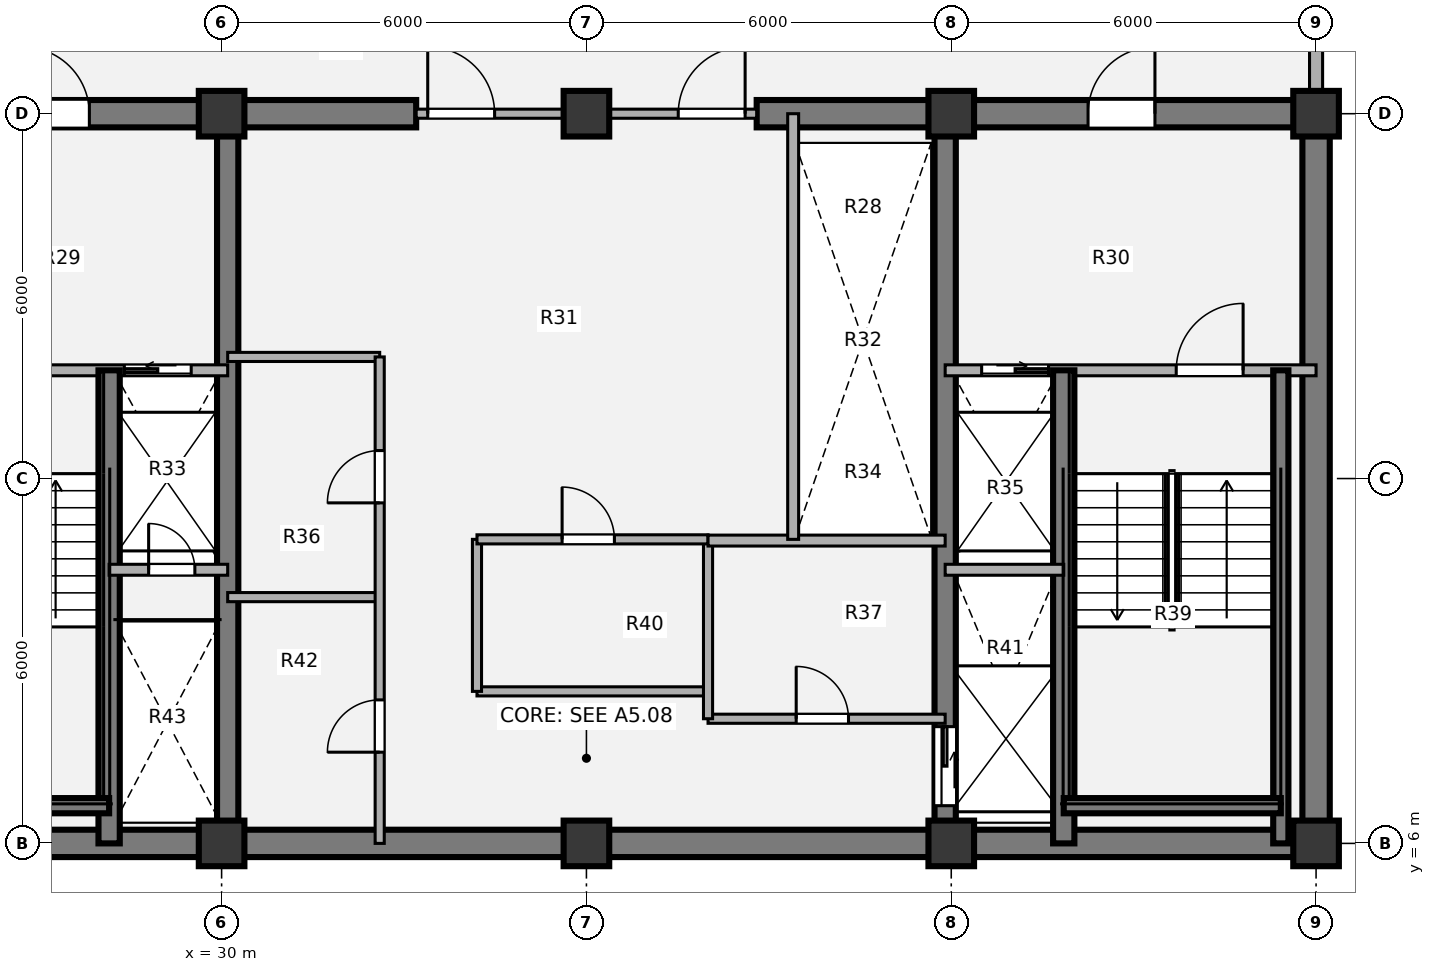
"""IFC4 building model, lengths in metres.
Left out: names, types, materials, properties, quantities, classifications, styles, units other than length and angle.
Written with IfcOpenShell. Run it as: python <this file> out.ifc"""

import sys

from ifc_helpers import new_model, si_unit, direction, frame, frame_2d, origin, origin_2d, place, context, subcontext, project, spatial, rectangle, extrude, source, transform, mapped, element, fill, save


model = new_model("IFC4")
c1 = context("Model", 3, precision=1e-05, world=origin(), true_north=direction((0.0, 1.0)))
c2 = subcontext(c1, "Body", "Model", "MODEL_VIEW")
j1 = project(units=[si_unit("LENGTHUNIT", "METRE"), si_unit("PLANEANGLEUNIT", "RADIAN")], contexts=[c1])
p1 = place(None, origin())
s1 = spatial("IfcSite", under=j1, at=p1, CompositionType="ELEMENT")
p2 = place(p1, origin())
s2 = spatial("IfcBuilding", under=s1, at=p2, CompositionType="ELEMENT")
p3 = place(p2, frame((0.0, 0.0, 160.2)))
s3 = spatial("IfcBuildingStorey", under=s2, at=p3, CompositionType="ELEMENT", Elevation=160.2)
m1 = source(origin(), c2, "Body", "SweptSolid", [
    extrude(rectangle(XDim=0.75, YDim=0.75, at=origin_2d()), origin(), (0.0, 0.0, 1.0), 3.78),
])
for number, where, z_axis, x_axis in (
    (1, (30.0, 6.0, 0.0), (0.0, 0.0, 1.0), (1.0, 0.0, 0.0)),
    (2, (36.0, 6.0, 0.0), (0.0, 0.0, 1.0), (1.0, 0.0, 0.0)),
    (3, (42.0, 6.0, 0.0), (0.0, 0.0, 1.0), (1.0, 0.0, 0.0)),
    (4, (48.0, 6.0, 0.0), (0.0, 0.0, 1.0), (1.0, 0.0, 0.0)),
    (5, (30.0, 18.0, 0.0), (0.0, 0.0, 1.0), (1.0, 0.0, 0.0)),
    (6, (36.0, 18.0, 0.0), (0.0, 0.0, 1.0), (1.0, 0.0, 0.0)),
    (7, (42.0, 18.0, 0.0), (0.0, 0.0, 1.0), (1.0, 0.0, 0.0)),
    (8, (48.0, 18.0, 0.0), (0.0, 0.0, 1.0), (1.0, 0.0, 0.0)),
):
    element("IfcColumn", number, at=place(p3, frame(where, z_axis=z_axis, x_axis=x_axis)), inside=s3, PredefinedType="COLUMN", context=c2, shape_type="MappedRepresentation", body=[
        mapped(m1, transform((0.0, 0.0, 0.0), x_axis=(1.0, 0.0, 0.0), y_axis=(0.0, 1.0, 0.0), z_axis=(0.0, 0.0, 1.0), scale=1.0)),
    ])
p4 = place(p3, frame((48.225, 6.0, 0.0), z_axis=(0.0, 0.0, 1.0), x_axis=(-1.0, 0.0, 0.0)))
e9 = element("IfcWall", 9, at=p4, inside=s3, PredefinedType="SHEAR", context=c2, shape_type="SweptSolid", body=[
    extrude(rectangle(XDim=24.45, YDim=0.45, at=frame_2d((12.225, 0.0))), origin(), (0.0, 0.0, 1.0), 3.78),
])
p5 = place(p3, frame((48.0, 18.0, 0.0), z_axis=(0.0, 0.0, 1.0), x_axis=(0.0, -1.0, 0.0)))
e10 = element("IfcWall", 10, at=p5, inside=s3, PredefinedType="SHEAR", context=c2, shape_type="SweptSolid", body=[
    extrude(rectangle(XDim=12.0, YDim=0.45, at=frame_2d((6.0, 0.0))), origin(), (0.0, 0.0, 1.0), 3.78),
])
p6 = place(p3, frame((23.775, 18.0, 0.0), z_axis=(0.0, 0.0, 1.0), x_axis=(1.0, 0.0, 0.0)))
e11 = element("IfcWall", 11, at=p6, inside=s3, PredefinedType="SHEAR", context=c2, shape_type="SweptSolid", body=[
    extrude(rectangle(XDim=9.425, YDim=0.45, at=frame_2d((4.712, 0.0))), origin(), (0.0, 0.0, 1.0), 3.78),
])
p7 = place(p6, frame((2.95, 0.0, 0.0)))
e12 = element("IfcOpeningElement", 12, at=p7, cuts=e11, PredefinedType="OPENING", context=c2, shape_type="SweptSolid", body=[
    extrude(rectangle(XDim=1.1, YDim=2.1, at=origin_2d()), frame((0.55, 0.235, 1.05), z_axis=(0.0, -1.0, 0.0), x_axis=(1.0, 0.0, 0.0)), (0.0, 0.0, 1.0), 0.47),
])
p8 = place(p3, frame((38.8, 18.0, 0.0), z_axis=(0.0, 0.0, 1.0), x_axis=(1.0, 0.0, 0.0)))
e13 = element("IfcWall", 13, at=p8, inside=s3, PredefinedType="SHEAR", context=c2, shape_type="SweptSolid", body=[
    extrude(rectangle(XDim=9.425, YDim=0.45, at=frame_2d((4.712, 0.0))), origin(), (0.0, 0.0, 1.0), 3.78),
])
p9 = place(p8, frame((5.45, 0.0, 0.0)))
e14 = element("IfcOpeningElement", 14, at=p9, cuts=e13, PredefinedType="OPENING", context=c2, shape_type="SweptSolid", body=[
    extrude(rectangle(XDim=1.1, YDim=2.1, at=origin_2d()), frame((0.55, 0.235, 1.05), z_axis=(0.0, -1.0, 0.0), x_axis=(1.0, 0.0, 0.0)), (0.0, 0.0, 1.0), 0.47),
])
p10 = place(p3, frame((30.1, 6.0, 0.0), z_axis=(0.0, 0.0, 1.0), x_axis=(0.0, 1.0, 0.0)))
e15 = element("IfcWall", 15, at=p10, inside=s3, PredefinedType="SHEAR", context=c2, shape_type="SweptSolid", body=[
    extrude(rectangle(XDim=12.0, YDim=0.35, at=frame_2d((6.0, 0.0))), origin(), (0.0, 0.0, 1.0), 3.78),
])
p11 = place(p3, frame((41.9, 18.0, 0.0), z_axis=(0.0, 0.0, 1.0), x_axis=(0.0, -1.0, 0.0)))
e16 = element("IfcWall", 16, at=p11, inside=s3, PredefinedType="SHEAR", context=c2, shape_type="SweptSolid", body=[
    extrude(rectangle(XDim=12.0, YDim=0.35, at=frame_2d((6.0, 0.0))), origin(), (0.0, 0.0, 1.0), 3.78),
])
p12 = place(p11, frame((10.08, 0.0, 0.0)))
e17 = element("IfcOpeningElement", 17, at=p12, cuts=e16, PredefinedType="OPENING", context=c2, shape_type="SweptSolid", body=[
    extrude(rectangle(XDim=1.3, YDim=2.1, at=origin_2d()), frame((0.65, 0.185, 1.05), z_axis=(0.0, -1.0, 0.0), x_axis=(1.0, 0.0, 0.0)), (0.0, 0.0, 1.0), 0.37),
])
p13 = place(p3, frame((48.0, 21.05, 0.0), z_axis=(0.0, 0.0, 1.0), x_axis=(0.0, -1.0, 0.0)))
e18 = element("IfcWall", 18, at=p13, inside=s3, PredefinedType="SOLIDWALL", context=c2, shape_type="SweptSolid", body=[
    extrude(rectangle(XDim=2.695, YDim=0.215, at=frame_2d((1.348, 0.0))), origin(), (0.0, 0.0, 1.0), 2.718),
])
p14 = place(p3, frame((30.1, 14.0, 0.0), z_axis=(0.0, 0.0, 1.0), x_axis=(1.0, 0.0, 0.0)))
e19 = element("IfcWall", 19, at=p14, inside=s3, PredefinedType="PARTITIONING", context=c2, shape_type="SweptSolid", body=[
    extrude(rectangle(XDim=2.5, YDim=0.15, at=frame_2d((1.25, 0.0))), origin(), (0.0, 0.0, 1.0), 3.5),
])
p15 = place(p3, frame((34.2, 8.5, 0.0), z_axis=(0.0, 0.0, 1.0), x_axis=(1.0, 0.0, 0.0)))
e20 = element("IfcWall", 20, at=p15, inside=s3, PredefinedType="PARTITIONING", context=c2, shape_type="SweptSolid", body=[
    extrude(rectangle(XDim=3.8, YDim=0.15, at=frame_2d((1.9, 0.0))), origin(), (0.0, 0.0, 1.0), 3.5),
])
p16 = place(p3, frame((38.0, 8.05, 0.0), z_axis=(0.0, 0.0, 1.0), x_axis=(1.0, 0.0, 0.0)))
e21 = element("IfcWall", 21, at=p16, inside=s3, PredefinedType="PARTITIONING", context=c2, shape_type="SweptSolid", body=[
    extrude(rectangle(XDim=3.9, YDim=0.15, at=frame_2d((1.95, 0.0))), origin(), (0.0, 0.0, 1.0), 3.5),
])
p17 = place(p16, frame((1.45, 0.0, 0.0)))
e22 = element("IfcOpeningElement", 22, at=p17, cuts=e21, PredefinedType="OPENING", context=c2, shape_type="SweptSolid", body=[
    extrude(rectangle(XDim=0.86, YDim=2.1, at=origin_2d()), frame((0.43, 0.085, 1.05), z_axis=(0.0, -1.0, 0.0), x_axis=(1.0, 0.0, 0.0)), (0.0, 0.0, 1.0), 0.17),
])
p18 = place(p3, frame((34.2, 8.5, 0.0), z_axis=(0.0, 0.0, 1.0), x_axis=(0.0, 1.0, 0.0)))
e23 = element("IfcWall", 23, at=p18, inside=s3, PredefinedType="PARTITIONING", context=c2, shape_type="SweptSolid", body=[
    extrude(rectangle(XDim=2.5, YDim=0.15, at=frame_2d((1.25, 0.0))), origin(), (0.0, 0.0, 1.0), 3.5),
])
p19 = place(p3, frame((38.0, 8.05, 0.0), z_axis=(0.0, 0.0, 1.0), x_axis=(0.0, 1.0, 0.0)))
e24 = element("IfcWall", 24, at=p19, inside=s3, PredefinedType="PARTITIONING", context=c2, shape_type="SweptSolid", body=[
    extrude(rectangle(XDim=2.95, YDim=0.15, at=frame_2d((1.475, 0.0))), origin(), (0.0, 0.0, 1.0), 3.5),
])
p20 = place(p3, frame((34.2, 11.0, 0.0), z_axis=(0.0, 0.0, 1.0), x_axis=(1.0, 0.0, 0.0)))
e25 = element("IfcWall", 25, at=p20, inside=s3, PredefinedType="PARTITIONING", context=c2, shape_type="SweptSolid", body=[
    extrude(rectangle(XDim=3.8, YDim=0.15, at=frame_2d((1.9, 0.0))), origin(), (0.0, 0.0, 1.0), 3.5),
])
p21 = place(p20, frame((1.4, 0.0, 0.0)))
e26 = element("IfcOpeningElement", 26, at=p21, cuts=e25, PredefinedType="OPENING", context=c2, shape_type="SweptSolid", body=[
    extrude(rectangle(XDim=0.86, YDim=2.1, at=origin_2d()), frame((0.43, 0.085, 1.05), z_axis=(0.0, -1.0, 0.0), x_axis=(1.0, 0.0, 0.0)), (0.0, 0.0, 1.0), 0.17),
])
p22 = place(p3, frame((38.0, 10.98, 0.0), z_axis=(0.0, 0.0, 1.0), x_axis=(1.0, 0.0, 0.0)))
e27 = element("IfcWall", 27, at=p22, inside=s3, PredefinedType="PARTITIONING", context=c2, shape_type="SweptSolid", body=[
    extrude(rectangle(XDim=3.9, YDim=0.18, at=frame_2d((1.95, 0.0))), origin(), (0.0, 0.0, 1.0), 3.5),
])
p23 = place(p3, frame((39.4, 11.0, 0.0), z_axis=(0.0, 0.0, 1.0), x_axis=(0.0, 1.0, 0.0)))
e28 = element("IfcWall", 28, at=p23, inside=s3, PredefinedType="PARTITIONING", context=c2, shape_type="SweptSolid", body=[
    extrude(rectangle(XDim=7.0, YDim=0.18, at=frame_2d((3.5, 0.0))), origin(), (0.0, 0.0, 1.0), 3.5),
])
p24 = place(p3, frame((30.1, 10.05, 0.0), z_axis=(0.0, 0.0, 1.0), x_axis=(1.0, 0.0, 0.0)))
e29 = element("IfcWall", 29, at=p24, inside=s3, PredefinedType="PARTITIONING", context=c2, shape_type="SweptSolid", body=[
    extrude(rectangle(XDim=2.5, YDim=0.15, at=frame_2d((1.25, 0.0))), origin(), (0.0, 0.0, 1.0), 3.5),
])
p25 = place(p3, frame((32.6, 6.0, 0.0), z_axis=(0.0, 0.0, 1.0), x_axis=(0.0, 1.0, 0.0)))
e30 = element("IfcWall", 30, at=p25, inside=s3, PredefinedType="PARTITIONING", context=c2, shape_type="SweptSolid", body=[
    extrude(rectangle(XDim=8.0, YDim=0.15, at=frame_2d((4.0, 0.0))), origin(), (0.0, 0.0, 1.0), 3.5),
])
p26 = place(p25, frame((1.5, 0.0, 0.0)))
e31 = element("IfcOpeningElement", 31, at=p26, cuts=e30, PredefinedType="OPENING", context=c2, shape_type="SweptSolid", body=[
    extrude(rectangle(XDim=0.86, YDim=2.1, at=origin_2d()), frame((0.43, 0.085, 1.05), z_axis=(0.0, -1.0, 0.0), x_axis=(1.0, 0.0, 0.0)), (0.0, 0.0, 1.0), 0.17),
])
p27 = place(p25, frame((5.6, 0.0, 0.0)))
e32 = element("IfcOpeningElement", 32, at=p27, cuts=e30, PredefinedType="OPENING", context=c2, shape_type="SweptSolid", body=[
    extrude(rectangle(XDim=0.86, YDim=2.1, at=origin_2d()), frame((0.43, 0.085, 1.05), z_axis=(0.0, -1.0, 0.0), x_axis=(1.0, 0.0, 0.0)), (0.0, 0.0, 1.0), 0.17),
])
p28 = place(p3, frame((33.2, 18.0, 0.0), z_axis=(0.0, 0.0, 1.0), x_axis=(1.0, 0.0, 0.0)))
e33 = element("IfcWall", 33, at=p28, inside=s3, PredefinedType="PARTITIONING", context=c2, shape_type="SweptSolid", body=[
    extrude(rectangle(XDim=5.6, YDim=0.15, at=frame_2d((2.8, 0.0))), origin(), (0.0, 0.0, 1.0), 2.515),
])
p29 = place(p28, frame((0.19, 0.0, 0.0)))
e34 = element("IfcOpeningElement", 34, at=p29, cuts=e33, PredefinedType="OPENING", context=c2, shape_type="SweptSolid", body=[
    extrude(rectangle(XDim=1.1, YDim=2.1, at=origin_2d()), frame((0.55, 0.085, 1.05), z_axis=(0.0, -1.0, 0.0), x_axis=(1.0, 0.0, 0.0)), (0.0, 0.0, 1.0), 0.17),
])
p30 = place(p28, frame((4.31, 0.0, 0.0)))
e35 = element("IfcOpeningElement", 35, at=p30, cuts=e33, PredefinedType="OPENING", context=c2, shape_type="SweptSolid", body=[
    extrude(rectangle(XDim=1.1, YDim=2.1, at=origin_2d()), frame((0.55, 0.085, 1.05), z_axis=(0.0, -1.0, 0.0), x_axis=(1.0, 0.0, 0.0)), (0.0, 0.0, 1.0), 0.17),
])
p31 = place(p3, frame((24.0, 13.78, 0.0), z_axis=(0.0, 0.0, 1.0), x_axis=(1.0, 0.0, 0.0)))
e36 = element("IfcWall", 36, at=p31, inside=s3, PredefinedType="PARTITIONING", context=c2, shape_type="SweptSolid", body=[
    extrude(rectangle(XDim=6.1, YDim=0.18, at=frame_2d((3.05, 0.0))), origin(), (0.0, 0.0, 1.0), 3.5),
])
p32 = place(p31, frame((1.15, 0.0, 0.0)))
e37 = element("IfcOpeningElement", 37, at=p32, cuts=e36, PredefinedType="OPENING", context=c2, shape_type="SweptSolid", body=[
    extrude(rectangle(XDim=1.1, YDim=2.1, at=origin_2d()), frame((0.55, 0.1, 1.05), z_axis=(0.0, -1.0, 0.0), x_axis=(1.0, 0.0, 0.0)), (0.0, 0.0, 1.0), 0.2),
])
p33 = place(p31, frame((4.4, 0.0, 0.0)))
e38 = element("IfcOpeningElement", 38, at=p33, cuts=e36, PredefinedType="OPENING", context=c2, shape_type="SweptSolid", body=[
    extrude(rectangle(XDim=1.1, YDim=2.1, at=origin_2d()), frame((0.55, 0.1, 1.05), z_axis=(0.0, -1.0, 0.0), x_axis=(1.0, 0.0, 0.0)), (0.0, 0.0, 1.0), 0.2),
])
p34 = place(p3, frame((28.15, 6.0, 0.0), z_axis=(0.0, 0.0, 1.0), x_axis=(0.0, 1.0, 0.0)))
e39 = element("IfcWall", 39, at=p34, inside=s3, PredefinedType="SHEAR", context=c2, shape_type="SweptSolid", body=[
    extrude(rectangle(XDim=7.78, YDim=0.35, at=frame_2d((3.89, 0.0))), origin(), (0.0, 0.0, 1.0), 3.85),
])
p35 = place(p3, frame((24.58, 6.62, 0.0), z_axis=(0.0, 0.0, 1.0), x_axis=(1.0, 0.0, 0.0)))
e40 = element("IfcWall", 40, at=p35, inside=s3, PredefinedType="SHEAR", context=c2, shape_type="SweptSolid", body=[
    extrude(rectangle(XDim=3.57, YDim=0.25, at=frame_2d((1.785, 0.0))), origin(), (0.0, 0.0, 1.0), 3.85),
])
p36 = place(p3, frame((28.15, 10.5, 0.0), z_axis=(0.0, 0.0, 1.0), x_axis=(1.0, 0.0, 0.0)))
e41 = element("IfcWall", 41, at=p36, inside=s3, PredefinedType="PARTITIONING", context=c2, shape_type="SweptSolid", body=[
    extrude(rectangle(XDim=1.95, YDim=0.18, at=frame_2d((0.975, 0.0))), origin(), (0.0, 0.0, 1.0), 3.5),
])
p37 = place(p36, frame((0.65, 0.0, 0.0)))
e42 = element("IfcOpeningElement", 42, at=p37, cuts=e41, PredefinedType="OPENING", context=c2, shape_type="SweptSolid", body=[
    extrude(rectangle(XDim=0.76, YDim=2.05, at=origin_2d()), frame((0.38, 0.1, 1.025), z_axis=(0.0, -1.0, 0.0), x_axis=(1.0, 0.0, 0.0)), (0.0, 0.0, 1.0), 0.2),
])
p38 = place(p3, frame((41.9, 13.78, 0.0), z_axis=(0.0, 0.0, 1.0), x_axis=(1.0, 0.0, 0.0)))
e43 = element("IfcWall", 43, at=p38, inside=s3, PredefinedType="PARTITIONING", context=c2, shape_type="SweptSolid", body=[
    extrude(rectangle(XDim=6.1, YDim=0.18, at=frame_2d((3.05, 0.0))), origin(), (0.0, 0.0, 1.0), 3.5),
])
p39 = place(p38, frame((0.6, 0.0, 0.0)))
e44 = element("IfcOpeningElement", 44, at=p39, cuts=e43, PredefinedType="OPENING", context=c2, shape_type="SweptSolid", body=[
    extrude(rectangle(XDim=1.1, YDim=2.1, at=origin_2d()), frame((0.55, 0.1, 1.05), z_axis=(0.0, -1.0, 0.0), x_axis=(1.0, 0.0, 0.0)), (0.0, 0.0, 1.0), 0.2),
])
p40 = place(p38, frame((3.8, 0.0, 0.0)))
e45 = element("IfcOpeningElement", 45, at=p40, cuts=e43, PredefinedType="OPENING", context=c2, shape_type="SweptSolid", body=[
    extrude(rectangle(XDim=1.1, YDim=2.1, at=origin_2d()), frame((0.55, 0.1, 1.05), z_axis=(0.0, -1.0, 0.0), x_axis=(1.0, 0.0, 0.0)), (0.0, 0.0, 1.0), 0.2),
])
p41 = place(p3, frame((43.85, 6.0, 0.0), z_axis=(0.0, 0.0, 1.0), x_axis=(0.0, 1.0, 0.0)))
e46 = element("IfcWall", 46, at=p41, inside=s3, PredefinedType="SHEAR", context=c2, shape_type="SweptSolid", body=[
    extrude(rectangle(XDim=7.78, YDim=0.35, at=frame_2d((3.89, 0.0))), origin(), (0.0, 0.0, 1.0), 3.85),
])
p42 = place(p3, frame((47.42, 6.0, 0.0), z_axis=(0.0, 0.0, 1.0), x_axis=(0.0, 1.0, 0.0)))
e47 = element("IfcWall", 47, at=p42, inside=s3, PredefinedType="SHEAR", context=c2, shape_type="SweptSolid", body=[
    extrude(rectangle(XDim=7.78, YDim=0.25, at=frame_2d((3.89, 0.0))), origin(), (0.0, 0.0, 1.0), 3.85),
])
p43 = place(p3, frame((43.85, 6.62, 0.0), z_axis=(0.0, 0.0, 1.0), x_axis=(1.0, 0.0, 0.0)))
e48 = element("IfcWall", 48, at=p43, inside=s3, PredefinedType="SHEAR", context=c2, shape_type="SweptSolid", body=[
    extrude(rectangle(XDim=3.57, YDim=0.25, at=frame_2d((1.785, 0.0))), origin(), (0.0, 0.0, 1.0), 3.85),
])
p44 = place(p3, frame((41.9, 10.5, 0.0), z_axis=(0.0, 0.0, 1.0), x_axis=(1.0, 0.0, 0.0)))
e49 = element("IfcWall", 49, at=p44, inside=s3, PredefinedType="PARTITIONING", context=c2, shape_type="SweptSolid", body=[
    extrude(rectangle(XDim=1.95, YDim=0.18, at=frame_2d((0.975, 0.0))), origin(), (0.0, 0.0, 1.0), 3.5),
])
m2 = source(origin(), c2, "Body", "SweptSolid", [
    extrude(rectangle(XDim=0.86, YDim=2.1, at=origin_2d()), frame((0.43, 0.025, 1.05), z_axis=(0.0, -1.0, 0.0), x_axis=(1.0, 0.0, 0.0)), (0.0, 0.0, 1.0), 0.05),
])
p45 = place(p17, origin())
e50 = element("IfcDoor", 50, at=p45, inside=s3, OperationType="SINGLE_SWING_LEFT", PredefinedType="DOOR", context=c2, shape_type="MappedRepresentation", body=[
    mapped(m2, transform((0.0, 0.0, 0.0), x_axis=(1.0, 0.0, 0.0), y_axis=(0.0, 1.0, 0.0), z_axis=(0.0, 0.0, 1.0), scale=1.0)),
])
fill(e22, e50)
p46 = place(p21, origin())
e51 = element("IfcDoor", 51, at=p46, inside=s3, OperationType="SINGLE_SWING_LEFT", PredefinedType="DOOR", context=c2, shape_type="MappedRepresentation", body=[
    mapped(m2, transform((0.0, 0.0, 0.0), x_axis=(1.0, 0.0, 0.0), y_axis=(0.0, 1.0, 0.0), z_axis=(0.0, 0.0, 1.0), scale=1.0)),
])
fill(e26, e51)
p47 = place(p26, origin())
e52 = element("IfcDoor", 52, at=p47, inside=s3, OperationType="SINGLE_SWING_LEFT", PredefinedType="DOOR", context=c2, shape_type="MappedRepresentation", body=[
    mapped(m2, transform((0.0, 0.0, 0.0), x_axis=(1.0, 0.0, 0.0), y_axis=(0.0, 1.0, 0.0), z_axis=(0.0, 0.0, 1.0), scale=1.0)),
])
fill(e31, e52)
p48 = place(p27, origin())
e53 = element("IfcDoor", 53, at=p48, inside=s3, OperationType="SINGLE_SWING_LEFT", PredefinedType="DOOR", context=c2, shape_type="MappedRepresentation", body=[
    mapped(m2, transform((0.0, 0.0, 0.0), x_axis=(1.0, 0.0, 0.0), y_axis=(0.0, 1.0, 0.0), z_axis=(0.0, 0.0, 1.0), scale=1.0)),
])
fill(e32, e53)
m3 = source(origin(), c2, "Body", "SweptSolid", [
    extrude(rectangle(XDim=1.1, YDim=2.1, at=origin_2d()), frame((0.55, 0.025, 1.05), z_axis=(0.0, -1.0, 0.0), x_axis=(1.0, 0.0, 0.0)), (0.0, 0.0, 1.0), 0.05),
])
p49 = place(p29, origin())
e54 = element("IfcDoor", 54, at=p49, inside=s3, OperationType="SINGLE_SWING_LEFT", PredefinedType="DOOR", context=c2, shape_type="MappedRepresentation", body=[
    mapped(m3, transform((0.0, 0.0, 0.0), x_axis=(1.0, 0.0, 0.0), y_axis=(0.0, 1.0, 0.0), z_axis=(0.0, 0.0, 1.0), scale=1.0)),
])
fill(e34, e54)
p50 = place(p30, origin())
e55 = element("IfcDoor", 55, at=p50, inside=s3, OperationType="SINGLE_SWING_RIGHT", PredefinedType="DOOR", context=c2, shape_type="MappedRepresentation", body=[
    mapped(m3, transform((0.0, 0.0, 0.0), x_axis=(1.0, 0.0, 0.0), y_axis=(0.0, 1.0, 0.0), z_axis=(0.0, 0.0, 1.0), scale=1.0)),
])
fill(e35, e55)
m4 = source(origin(), c2, "Body", "SweptSolid", [
    extrude(rectangle(XDim=1.1, YDim=2.1, at=origin_2d()), frame((0.55, 0.025, 1.05), z_axis=(0.0, -1.0, 0.0), x_axis=(1.0, 0.0, 0.0)), (0.0, 0.0, 1.0), 0.05),
])
p51 = place(p33, origin())
e56 = element("IfcDoor", 56, at=p51, inside=s3, OperationType="SLIDING_TO_LEFT", PredefinedType="DOOR", context=c2, shape_type="MappedRepresentation", body=[
    mapped(m4, transform((0.0, 0.0, 0.0), x_axis=(1.0, 0.0, 0.0), y_axis=(0.0, 1.0, 0.0), z_axis=(0.0, 0.0, 1.0), scale=1.0)),
])
fill(e38, e56)
m5 = source(origin(), c2, "Body", "SweptSolid", [
    extrude(rectangle(XDim=0.76, YDim=2.05, at=origin_2d()), frame((0.38, 0.025, 1.025), z_axis=(0.0, -1.0, 0.0), x_axis=(1.0, 0.0, 0.0)), (0.0, 0.0, 1.0), 0.05),
])
p52 = place(p37, origin())
e57 = element("IfcDoor", 57, at=p52, inside=s3, OperationType="SINGLE_SWING_LEFT", PredefinedType="DOOR", context=c2, shape_type="MappedRepresentation", body=[
    mapped(m5, transform((0.0, 0.0, 0.0), x_axis=(1.0, 0.0, 0.0), y_axis=(0.0, 1.0, 0.0), z_axis=(0.0, 0.0, 1.0), scale=1.0)),
])
fill(e42, e57)
p53 = place(p39, origin())
e58 = element("IfcDoor", 58, at=p53, inside=s3, OperationType="SLIDING_TO_RIGHT", PredefinedType="DOOR", context=c2, shape_type="MappedRepresentation", body=[
    mapped(m4, transform((0.0, 0.0, 0.0), x_axis=(1.0, 0.0, 0.0), y_axis=(0.0, 1.0, 0.0), z_axis=(0.0, 0.0, 1.0), scale=1.0)),
])
fill(e44, e58)
m6 = source(origin(), c2, "Body", "SweptSolid", [
    extrude(rectangle(XDim=1.1, YDim=2.1, at=origin_2d()), frame((0.55, 0.025, 1.05), z_axis=(0.0, -1.0, 0.0), x_axis=(1.0, 0.0, 0.0)), (0.0, 0.0, 1.0), 0.05),
])
p54 = place(p40, origin())
e59 = element("IfcDoor", 59, at=p54, inside=s3, OperationType="SINGLE_SWING_RIGHT", PredefinedType="DOOR", context=c2, shape_type="MappedRepresentation", body=[
    mapped(m6, transform((0.0, 0.0, 0.0), x_axis=(1.0, 0.0, 0.0), y_axis=(0.0, 1.0, 0.0), z_axis=(0.0, 0.0, 1.0), scale=1.0)),
])
fill(e45, e59)
m7 = source(origin(), c2, "Body", "SweptSolid", [
    extrude(rectangle(XDim=1.3, YDim=2.1, at=origin_2d()), frame((0.65, 0.025, 1.05), z_axis=(0.0, -1.0, 0.0), x_axis=(1.0, 0.0, 0.0)), (0.0, 0.0, 1.0), 0.05),
])
p55 = place(p12, origin())
e60 = element("IfcDoor", 60, at=p55, inside=s3, OperationType="SLIDING_TO_LEFT", PredefinedType="DOOR", context=c2, shape_type="MappedRepresentation", body=[
    mapped(m7, transform((0.0, 0.0, 0.0), x_axis=(1.0, 0.0, 0.0), y_axis=(0.0, 1.0, 0.0), z_axis=(0.0, 0.0, 1.0), scale=1.0)),
])
fill(e17, e60)
p56 = place(p7, origin())
e61 = element("IfcDoor", 61, at=p56, inside=s3, OperationType="SINGLE_SWING_LEFT", PredefinedType="DOOR", context=c2, shape_type="MappedRepresentation", body=[
    mapped(m3, transform((0.0, 0.0, 0.0), x_axis=(1.0, 0.0, 0.0), y_axis=(0.0, 1.0, 0.0), z_axis=(0.0, 0.0, 1.0), scale=1.0)),
])
fill(e12, e61)
p57 = place(p9, origin())
e62 = element("IfcDoor", 62, at=p57, inside=s3, OperationType="SINGLE_SWING_RIGHT", PredefinedType="DOOR", context=c2, shape_type="MappedRepresentation", body=[
    mapped(m3, transform((0.0, 0.0, 0.0), x_axis=(1.0, 0.0, 0.0), y_axis=(0.0, 1.0, 0.0), z_axis=(0.0, 0.0, 1.0), scale=1.0)),
])
fill(e14, e62)
save(model, sys.argv[1])
